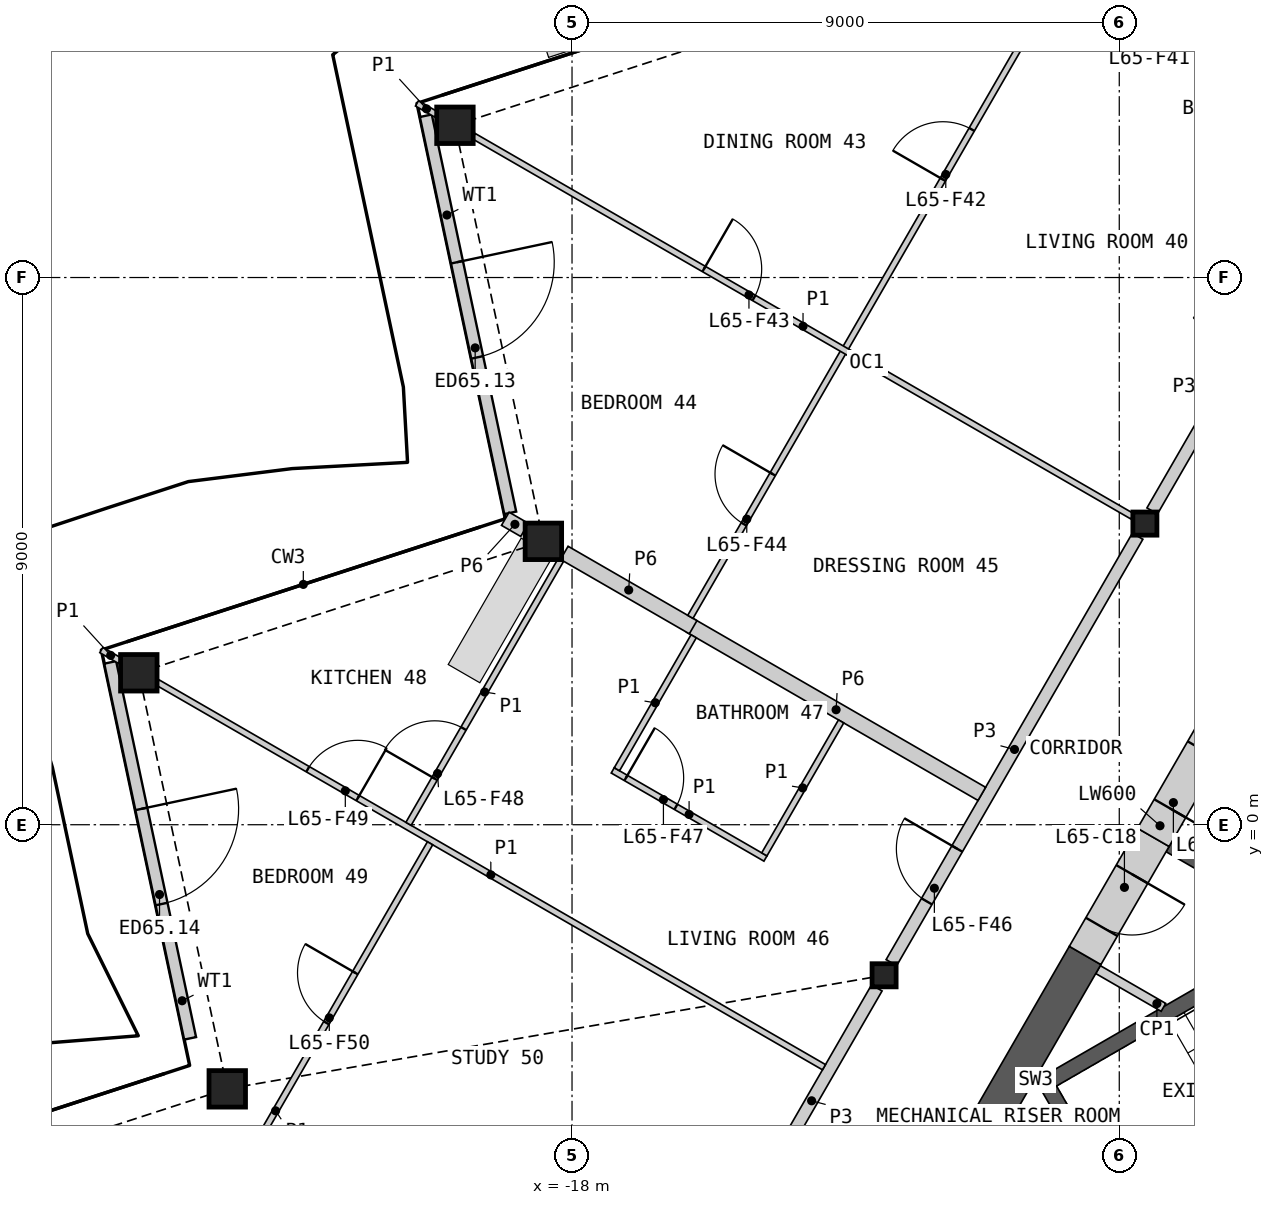
"""IFC4 building model, lengths in metres.
Left out: names, types, materials, properties, quantities, classifications, styles, units other than length and angle.
Written with IfcOpenShell. Run it as: python <this file> out.ifc"""

import sys

from ifc_helpers import new_model, si_unit, direction, frame, frame_2d, origin, origin_2d, place, context, subcontext, project, spatial, polyline, rectangle, hollow_rectangle, i_section, outline, extrude, element, fill, save


model = new_model("IFC4")
c1 = context("Model", 3, precision=1e-05, world=origin(), true_north=direction((0.0, 1.0)))
c2 = subcontext(c1, "Body", "Model", "MODEL_VIEW")
j1 = project(units=[si_unit("LENGTHUNIT", "METRE"), si_unit("PLANEANGLEUNIT", "RADIAN")], contexts=[c1])
p1 = place(None, origin())
s1 = spatial("IfcSite", under=j1, at=p1, CompositionType="ELEMENT")
p2 = place(p1, origin())
s2 = spatial("IfcBuilding", under=s1, at=p2, CompositionType="ELEMENT")
p3 = place(p2, frame((0.0, 0.0, 301.8)))
s3 = spatial("IfcBuildingStorey", under=s2, at=p3, CompositionType="ELEMENT", Elevation=301.8)
for number, where, z_axis, x_axis in (
    (1, (-19.926, 11.504, 0.0), (0.0, 0.0, 1.0), (1.0, 0.0, 0.0)),
    (2, (-18.471, 4.661, 0.0), (0.0, 0.0, 1.0), (1.0, 0.0, 0.0)),
    (3, (-25.125, 2.499, 0.0), (0.0, 0.0, 1.0), (1.0, 0.0, 0.0)),
    (4, (-23.67, -4.344, 0.0), (0.0, 0.0, 1.0), (1.0, 0.0, 0.0)),
):
    element("IfcColumn", number, at=place(p3, frame(where, z_axis=z_axis, x_axis=x_axis)), inside=s3, PredefinedType="COLUMN", context=c2, shape_type="SweptSolid", body=[
        extrude(hollow_rectangle(XDim=0.6, YDim=0.6, WallThickness=0.04, at=origin_2d()), origin(), (0.0, 0.0, 1.0), 3.4),
    ])
for number, where, z_axis, x_axis in (
    (5, (-8.578, 4.953, 0.0), (0.0, 0.0, 1.0), (1.0, 0.0, 0.0)),
    (6, (-12.868, -2.476, 0.0), (0.0, 0.0, 1.0), (1.0, 0.0, 0.0)),
):
    element("IfcColumn", number, at=place(p3, frame(where, z_axis=z_axis, x_axis=x_axis)), inside=s3, PredefinedType="COLUMN", context=c2, shape_type="SweptSolid", body=[
        extrude(i_section(OverallWidth=0.396, OverallDepth=0.381, WebThickness=0.019, FlangeThickness=0.03, at=origin_2d()), origin(), (0.0, 0.0, 1.0), 3.4),
    ])
p4 = place(p3, frame((-20.404, 11.661, 0.0), z_axis=(0.0, 0.0, 1.0), x_axis=(0.207893301034, -0.978151509422, 0.0)))
e7 = element("IfcWall", 7, at=p4, inside=s3, PredefinedType="SOLIDWALL", context=c2, shape_type="SweptSolid", body=[
    extrude(rectangle(XDim=6.677, YDim=0.2, at=frame_2d((3.339, 0.0))), origin(), (0.0, 0.0, 1.0), 2.488),
])
p5 = place(p4, frame((2.463, 0.0, 0.0)))
e8 = element("IfcOpeningElement", 8, at=p5, cuts=e7, PredefinedType="OPENING", context=c2, shape_type="SweptSolid", body=[
    extrude(rectangle(XDim=1.6, YDim=2.25, at=frame_2d((0.8, 1.125))), frame((0.0, 0.11, 0.0), z_axis=(0.0, -1.0, 0.0), x_axis=(1.0, 0.0, 0.0)), (0.0, 0.0, 1.0), 0.22),
])
p6 = place(p3, frame((-25.595, 2.67, 0.0), z_axis=(0.0, 0.0, 1.0), x_axis=(0.207888316408, -0.978152568826, 0.0)))
e9 = element("IfcWall", 9, at=p6, inside=s3, PredefinedType="SOLIDWALL", context=c2, shape_type="SweptSolid", body=[
    extrude(rectangle(XDim=6.322, YDim=0.2, at=frame_2d((3.161, 0.0))), origin(), (0.0, 0.0, 1.0), 2.488),
])
p7 = place(p6, frame((2.463, 0.0, 0.0)))
e10 = element("IfcOpeningElement", 10, at=p7, cuts=e9, PredefinedType="OPENING", context=c2, shape_type="SweptSolid", body=[
    extrude(rectangle(XDim=1.6, YDim=2.25, at=frame_2d((0.8, 1.125))), frame((0.0, 0.11, 0.0), z_axis=(0.0, -1.0, 0.0), x_axis=(1.0, 0.0, 0.0)), (0.0, 0.0, 1.0), 0.22),
])
p8 = place(p3, origin())
e11 = element("IfcWall", 11, at=p8, inside=s3, PredefinedType="SHEAR", context=c2, shape_type="SweptSolid", body=[
    extrude(outline(polyline([(-6.061, -1.697), (-8.231, -0.444), (-8.131, -0.271), (-5.96, -1.524), (-6.061, -1.697)])), origin(), (0.0, 0.0, 1.0), 3.1),
])
p9 = place(p3, origin())
e12 = element("IfcWall", 12, at=p9, inside=s3, PredefinedType="SHEAR", context=c2, shape_type="SweptSolid", body=[
    extrude(outline(polyline([(-5.307, -1.281), (-10.374, -4.206), (-10.032, -4.298), (-5.182, -1.498), (-5.307, -1.281)])), origin(), (0.0, 0.0, 1.0), 3.1),
])
p10 = place(p3, origin())
e13 = element("IfcWall", 13, at=p10, inside=s3, PredefinedType="SHEAR", context=c2, shape_type="SweptSolid", body=[
    extrude(outline(polyline([(-10.374, -4.206), (-8.83, -6.881), (-8.738, -6.539), (-10.032, -4.298), (-10.374, -4.206)])), origin(), (0.0, 0.0, 1.0), 3.1),
])
p11 = place(p3, origin())
e14 = element("IfcWall", 14, at=p11, inside=s3, PredefinedType="SHEAR", context=c2, shape_type="SweptSolid", body=[
    extrude(outline(polyline([(-8.738, -6.539), (-8.83, -6.881), (-3.763, -3.956), (-3.888, -3.739), (-8.738, -6.539)])), origin(), (0.0, 0.0, 1.0), 3.1),
])
p12 = place(p3, frame((-9.35, -2.383, 0.0), z_axis=(0.0, 0.0, 1.0), x_axis=(0.866057962423, -0.499943602543, 0.0)))
e15 = element("IfcWall", 15, at=p12, inside=s3, PredefinedType="PARTITIONING", context=c2, shape_type="SweptSolid", body=[
    extrude(rectangle(XDim=1.242, YDim=0.15, at=frame_2d((0.621, 0.0))), origin(), (0.0, 0.0, 1.0), 3.1),
])
p13 = place(p3, frame((-9.562, -2.15, 0.0), z_axis=(0.0, 0.0, 1.0), x_axis=(-0.500015214976, -0.866016619236, 0.0)))
e16 = element("IfcWall", 16, at=p13, inside=s3, PredefinedType="SHEAR", context=c2, shape_type="SweptSolid", body=[
    extrude(rectangle(XDim=5.318, YDim=0.6, at=frame_2d((2.659, 0.0))), origin(), (0.0, 0.0, 1.0), 3.1),
])
p14 = place(p3, frame((-8.44, -0.208, 0.0), z_axis=(0.0, 0.0, 1.0), x_axis=(-0.500001951578, -0.866024277037, 0.0)))
e17 = element("IfcWall", 17, at=p14, inside=s3, PredefinedType="SHEAR", context=c2, shape_type="SweptSolid", body=[
    extrude(rectangle(XDim=2.243, YDim=0.6, at=frame_2d((1.122, 0.0))), origin(), (0.0, 0.0, 1.0), 3.1),
])
p15 = place(p14, frame((0.7, 0.0, 0.0)))
e18 = element("IfcOpeningElement", 18, at=p15, cuts=e17, PredefinedType="OPENING", context=c2, shape_type="SweptSolid", body=[
    extrude(rectangle(XDim=1.0, YDim=2.1, at=frame_2d((0.5, 1.05))), frame((0.0, 0.31, 0.0), z_axis=(0.0, -1.0, 0.0), x_axis=(1.0, 0.0, 0.0)), (0.0, 0.0, 1.0), 0.62),
])
p16 = place(p3, frame((-7.34, 1.698, 0.0), z_axis=(0.0, 0.0, 1.0), x_axis=(-0.50002983664, -0.866008176907, 0.0)))
e19 = element("IfcWall", 19, at=p16, inside=s3, PredefinedType="SHEAR", context=c2, shape_type="SweptSolid", body=[
    extrude(rectangle(XDim=2.2, YDim=0.6, at=frame_2d((1.1, 0.0))), origin(), (0.0, 0.0, 1.0), 3.1),
])
p17 = place(p16, frame((0.55, 0.0, 0.0)))
e20 = element("IfcOpeningElement", 20, at=p17, cuts=e19, PredefinedType="OPENING", context=c2, shape_type="SweptSolid", body=[
    extrude(rectangle(XDim=1.1, YDim=2.1, at=frame_2d((0.55, 1.05))), frame((0.0, 0.31, 0.0), z_axis=(0.0, -1.0, 0.0), x_axis=(1.0, 0.0, 0.0)), (0.0, 0.0, 1.0), 0.62),
])
p18 = place(p3, frame((-8.458, 5.16, 0.0), z_axis=(0.0, 0.0, 1.0), x_axis=(0.499984266882, 0.866034487114, 0.0)))
e21 = element("IfcWall", 21, at=p18, inside=s3, PredefinedType="PARTITIONING", context=c2, shape_type="SweptSolid", body=[
    extrude(rectangle(XDim=8.099, YDim=0.2, at=frame_2d((4.049, 0.0))), origin(), (0.0, 0.0, 1.0), 3.1),
])
p19 = place(p18, frame((3.093, 0.0, 0.0)))
e22 = element("IfcOpeningElement", 22, at=p19, cuts=e21, PredefinedType="OPENING", context=c2, shape_type="SweptSolid", body=[
    extrude(rectangle(XDim=1.0, YDim=2.1, at=frame_2d((0.5, 1.05))), frame((0.0, 0.11, 0.0), z_axis=(0.0, -1.0, 0.0), x_axis=(1.0, 0.0, 0.0)), (0.0, 0.0, 1.0), 0.22),
])
p20 = place(p3, frame((-12.748, -2.269, 0.0), z_axis=(0.0, 0.0, 1.0), x_axis=(0.499984266882, 0.866034487114, 0.0)))
e23 = element("IfcWall", 23, at=p20, inside=s3, PredefinedType="PARTITIONING", context=c2, shape_type="SweptSolid", body=[
    extrude(rectangle(XDim=8.099, YDim=0.2, at=frame_2d((4.049, 0.0))), origin(), (0.0, 0.0, 1.0), 3.1),
])
p21 = place(p20, frame((1.164, 0.0, 0.0)))
e24 = element("IfcOpeningElement", 24, at=p21, cuts=e23, PredefinedType="OPENING", context=c2, shape_type="SweptSolid", body=[
    extrude(rectangle(XDim=1.0, YDim=2.1, at=frame_2d((0.5, 1.05))), frame((0.0, 0.11, 0.0), z_axis=(0.0, -1.0, 0.0), x_axis=(1.0, 0.0, 0.0)), (0.0, 0.0, 1.0), 0.22),
])
p22 = place(p3, frame((-16.054, 3.275, 0.0), z_axis=(0.0, 0.0, 1.0), x_axis=(0.866019581949, -0.500010083578, 0.0)))
e25 = element("IfcWall", 25, at=p22, inside=s3, PredefinedType="PARTITIONING", context=c2, shape_type="SweptSolid", body=[
    extrude(rectangle(XDim=5.535, YDim=0.25, at=frame_2d((2.768, 0.0))), origin(), (0.0, 0.0, 1.0), 2.33),
])
p23 = place(p3, frame((-15.131, -6.397, 0.0), z_axis=(0.0, 0.0, 1.0), x_axis=(0.500003406062, 0.866023437285, 0.0)))
e26 = element("IfcWall", 26, at=p23, inside=s3, PredefinedType="PARTITIONING", context=c2, shape_type="SweptSolid", body=[
    extrude(rectangle(XDim=4.288, YDim=0.2, at=frame_2d((2.144, 0.0))), origin(), (0.0, 0.0, 1.0), 3.1),
])
p24 = place(p3, frame((-18.127, 4.472, 0.0), z_axis=(0.0, 0.0, 1.0), x_axis=(0.866017755388, -0.500013247177, 0.0)))
e27 = element("IfcWall", 27, at=p24, inside=s3, PredefinedType="PARTITIONING", context=c2, shape_type="SweptSolid", body=[
    extrude(rectangle(XDim=2.447, YDim=0.25, at=frame_2d((1.223, 0.0))), origin(), (0.0, 0.0, 1.0), 2.33),
])
p25 = place(p3, frame((-19.097, 5.032, 0.0), z_axis=(0.0, 0.0, 1.0), x_axis=(0.86609656662, -0.499876722092, 0.0)))
e28 = element("IfcWall", 28, at=p25, inside=s3, PredefinedType="PARTITIONING", context=c2, shape_type="SweptSolid", body=[
    extrude(rectangle(XDim=0.365, YDim=0.25, at=frame_2d((0.183, 0.0))), origin(), (0.0, 0.0, 1.0), 2.33),
])
p26 = place(p3, frame((-16.054, 3.419, 0.0), z_axis=(0.0, 0.0, 1.0), x_axis=(0.499999256795, 0.866025832873, 0.0)))
e29 = element("IfcWall", 29, at=p26, inside=s3, PredefinedType="PARTITIONING", context=c2, shape_type="SweptSolid", body=[
    extrude(rectangle(XDim=15.448, YDim=0.1, at=frame_2d((7.724, 0.0))), origin(), (0.0, 0.0, 1.0), 2.33),
])
p27 = place(p26, frame((8.306, 0.0, 0.0)))
e30 = element("IfcOpeningElement", 30, at=p27, cuts=e29, PredefinedType="OPENING", context=c2, shape_type="SweptSolid", body=[
    extrude(rectangle(XDim=0.95, YDim=2.1, at=frame_2d((0.475, 1.05))), frame((0.0, 0.06, 0.0), z_axis=(0.0, -1.0, 0.0), x_axis=(1.0, 0.0, 0.0)), (0.0, 0.0, 1.0), 0.12),
])
p28 = place(p26, frame((1.76, 0.0, 0.0)))
e31 = element("IfcOpeningElement", 31, at=p28, cuts=e29, PredefinedType="OPENING", context=c2, shape_type="SweptSolid", body=[
    extrude(rectangle(XDim=0.95, YDim=2.1, at=frame_2d((0.475, 1.05))), frame((0.0, 0.06, 0.0), z_axis=(0.0, -1.0, 0.0), x_axis=(1.0, 0.0, 0.0)), (0.0, 0.0, 1.0), 0.12),
])
p29 = place(p3, frame((-24.815, 2.339, 0.0), z_axis=(0.0, 0.0, 1.0), x_axis=(0.866021406514, -0.500006923412, 0.0)))
e32 = element("IfcWall", 32, at=p29, inside=s3, PredefinedType="PARTITIONING", context=c2, shape_type="SweptSolid", body=[
    extrude(rectangle(XDim=12.654, YDim=0.1, at=frame_2d((6.327, 0.0))), origin(), (0.0, 0.0, 1.0), 2.33),
])
p30 = place(p29, frame((2.851, 0.0, 0.0)))
e33 = element("IfcOpeningElement", 33, at=p30, cuts=e32, PredefinedType="OPENING", context=c2, shape_type="SweptSolid", body=[
    extrude(rectangle(XDim=0.95, YDim=2.1, at=frame_2d((0.475, 1.05))), frame((0.0, 0.06, 0.0), z_axis=(0.0, -1.0, 0.0), x_axis=(1.0, 0.0, 0.0)), (0.0, 0.0, 1.0), 0.12),
])
p31 = place(p3, frame((-19.615, 11.325, 0.0), z_axis=(0.0, 0.0, 1.0), x_axis=(0.86602139559, -0.500006942333, 0.0)))
e34 = element("IfcWall", 34, at=p31, inside=s3, PredefinedType="PARTITIONING", context=c2, shape_type="SweptSolid", body=[
    extrude(rectangle(XDim=12.505, YDim=0.1, at=frame_2d((6.252, 0.0))), origin(), (0.0, 0.0, 1.0), 2.33),
])
p32 = place(p31, frame((4.37, 0.0, 0.0)))
e35 = element("IfcOpeningElement", 35, at=p32, cuts=e34, PredefinedType="OPENING", context=c2, shape_type="SweptSolid", body=[
    extrude(rectangle(XDim=0.95, YDim=2.1, at=frame_2d((0.475, 1.05))), frame((0.0, 0.06, 0.0), z_axis=(0.0, -1.0, 0.0), x_axis=(1.0, 0.0, 0.0)), (0.0, 0.0, 1.0), 0.12),
])
p33 = place(p3, frame((-23.722, -6.172, 0.0), z_axis=(0.0, 0.0, 1.0), x_axis=(0.499991774685, 0.86603015262, 0.0)))
e36 = element("IfcWall", 36, at=p33, inside=s3, PredefinedType="PARTITIONING", context=c2, shape_type="SweptSolid", body=[
    extrude(rectangle(XDim=6.774, YDim=0.1, at=frame_2d((3.387, 0.0))), origin(), (0.0, 0.0, 1.0), 2.33),
])
p34 = place(p33, frame((3.364, 0.0, 0.0)))
e37 = element("IfcOpeningElement", 37, at=p34, cuts=e36, PredefinedType="OPENING", context=c2, shape_type="SweptSolid", body=[
    extrude(rectangle(XDim=0.95, YDim=2.1, at=frame_2d((0.475, 1.05))), frame((0.0, 0.06, 0.0), z_axis=(0.0, -1.0, 0.0), x_axis=(1.0, 0.0, 0.0)), (0.0, 0.0, 1.0), 0.12),
])
p35 = place(p3, frame((-9.787, 14.174, 0.0), z_axis=(0.0, 0.0, 1.0), x_axis=(0.866031222068, -0.499989922303, 0.0)))
e38 = element("IfcWall", 38, at=p35, inside=s3, PredefinedType="PARTITIONING", context=c2, shape_type="SweptSolid", body=[
    extrude(rectangle(XDim=5.557, YDim=0.1, at=frame_2d((2.779, 0.0))), origin(), (0.0, 0.0, 1.0), 2.33),
])
p36 = place(p35, frame((1.853, 0.0, 0.0)))
e39 = element("IfcOpeningElement", 39, at=p36, cuts=e38, PredefinedType="OPENING", context=c2, shape_type="SweptSolid", body=[
    extrude(rectangle(XDim=0.95, YDim=2.1, at=frame_2d((0.475, 1.05))), frame((0.0, 0.06, 0.0), z_axis=(0.0, -1.0, 0.0), x_axis=(1.0, 0.0, 0.0)), (0.0, 0.0, 1.0), 0.12),
])
p37 = place(p3, frame((-20.689, 0.014, 0.0), z_axis=(0.0, 0.0, 1.0), x_axis=(0.500003822013, 0.866023197133, 0.0)))
e40 = element("IfcWall", 40, at=p37, inside=s3, PredefinedType="PARTITIONING", context=c2, shape_type="SweptSolid", body=[
    extrude(rectangle(XDim=5.007, YDim=0.1, at=frame_2d((2.504, 0.0))), origin(), (0.0, 0.0, 1.0), 2.33),
])
p38 = place(p37, frame((0.86, 0.0, 0.0)))
e41 = element("IfcOpeningElement", 41, at=p38, cuts=e40, PredefinedType="OPENING", context=c2, shape_type="SweptSolid", body=[
    extrude(rectangle(XDim=0.95, YDim=2.1, at=frame_2d((0.475, 1.05))), frame((0.0, 0.06, 0.0), z_axis=(0.0, -1.0, 0.0), x_axis=(1.0, 0.0, 0.0)), (0.0, 0.0, 1.0), 0.12),
])
p39 = place(p3, frame((-17.33, 0.894, 0.0), z_axis=(0.0, 0.0, 1.0), x_axis=(0.866032775405, -0.499987231761, 0.0)))
e42 = element("IfcWall", 42, at=p39, inside=s3, PredefinedType="PARTITIONING", context=c2, shape_type="SweptSolid", body=[
    extrude(rectangle(XDim=2.9, YDim=0.1, at=frame_2d((1.45, 0.0))), origin(), (0.0, 0.0, 1.0), 2.33),
])
p40 = place(p39, frame((0.25, 0.0, 0.0)))
e43 = element("IfcOpeningElement", 43, at=p40, cuts=e42, PredefinedType="OPENING", context=c2, shape_type="SweptSolid", body=[
    extrude(rectangle(XDim=0.95, YDim=2.1, at=frame_2d((0.475, 1.05))), frame((0.0, 0.06, 0.0), z_axis=(0.0, -1.0, 0.0), x_axis=(1.0, 0.0, 0.0)), (0.0, 0.0, 1.0), 0.12),
])
p41 = place(p3, frame((-14.837, -0.488, 0.0), z_axis=(0.0, 0.0, 1.0), x_axis=(0.499976333282, 0.866039067339, 0.0)))
e44 = element("IfcWall", 44, at=p41, inside=s3, PredefinedType="PARTITIONING", context=c2, shape_type="SweptSolid", body=[
    extrude(rectangle(XDim=2.525, YDim=0.1, at=frame_2d((1.262, 0.0))), origin(), (0.0, 0.0, 1.0), 2.33),
])
p42 = place(p3, frame((-17.262, 0.912, 0.0), z_axis=(0.0, 0.0, 1.0), x_axis=(0.500048846702, 0.865997200291, 0.0)))
e45 = element("IfcWall", 45, at=p42, inside=s3, PredefinedType="PARTITIONING", context=c2, shape_type="SweptSolid", body=[
    extrude(rectangle(XDim=2.525, YDim=0.1, at=frame_2d((1.263, 0.0))), origin(), (0.0, 0.0, 1.0), 2.33),
])
p43 = place(p3, frame((-20.55, 11.865, 0.0), z_axis=(0.0, 0.0, 1.0), x_axis=(0.866039913117, -0.499974868256, 0.0)))
e46 = element("IfcWall", 46, at=p43, inside=s3, PredefinedType="PARTITIONING", context=c2, shape_type="SweptSolid", body=[
    extrude(rectangle(XDim=0.363, YDim=0.1, at=frame_2d((0.181, 0.0))), origin(), (0.0, 0.0, 1.0), 2.33),
])
p44 = place(p3, frame((-25.741, 2.874, 0.0), z_axis=(0.0, 0.0, 1.0), x_axis=(0.865851769275, -0.500300623268, 0.0)))
e47 = element("IfcWall", 47, at=p44, inside=s3, PredefinedType="PARTITIONING", context=c2, shape_type="SweptSolid", body=[
    extrude(rectangle(XDim=0.353, YDim=0.1, at=frame_2d((0.177, 0.0))), origin(), (0.0, 0.0, 1.0), 2.33),
])
p45 = place(p5, origin())
e48 = element("IfcDoor", 48, at=p45, inside=s3, OperationType="DOUBLE_DOOR_SINGLE_SWING", PredefinedType="DOOR", context=c2, shape_type="SweptSolid", body=[
    extrude(rectangle(XDim=1.6, YDim=2.25, at=frame_2d((0.8, 1.125))), frame((0.0, 0.025, 0.0), z_axis=(0.0, -1.0, 0.0), x_axis=(1.0, 0.0, 0.0)), (0.0, 0.0, 1.0), 0.05),
])
fill(e8, e48)
p46 = place(p7, origin())
e49 = element("IfcDoor", 49, at=p46, inside=s3, OperationType="DOUBLE_DOOR_SINGLE_SWING", PredefinedType="DOOR", context=c2, shape_type="SweptSolid", body=[
    extrude(rectangle(XDim=1.6, YDim=2.25, at=frame_2d((0.8, 1.125))), frame((0.0, 0.025, 0.0), z_axis=(0.0, -1.0, 0.0), x_axis=(1.0, 0.0, 0.0)), (0.0, 0.0, 1.0), 0.05),
])
fill(e10, e49)
p47 = place(p15, origin())
e50 = element("IfcDoor", 50, at=p47, inside=s3, OperationType="SINGLE_SWING_LEFT", PredefinedType="DOOR", context=c2, shape_type="SweptSolid", body=[
    extrude(rectangle(XDim=1.0, YDim=2.1, at=frame_2d((0.5, 1.05))), frame((0.0, 0.055, 0.0), z_axis=(0.0, -1.0, 0.0), x_axis=(1.0, 0.0, 0.0)), (0.0, 0.0, 1.0), 0.05),
])
fill(e18, e50)
p48 = place(p17, origin())
e51 = element("IfcDoor", 51, at=p48, inside=s3, OperationType="SINGLE_SWING_RIGHT", PredefinedType="DOOR", context=c2, shape_type="SweptSolid", body=[
    extrude(rectangle(XDim=1.1, YDim=2.1, at=frame_2d((0.55, 1.05))), frame((0.0, 0.055, 0.0), z_axis=(0.0, -1.0, 0.0), x_axis=(1.0, 0.0, 0.0)), (0.0, 0.0, 1.0), 0.05),
])
fill(e20, e51)
p49 = place(p27, origin())
e52 = element("IfcDoor", 52, at=p49, inside=s3, OperationType="SINGLE_SWING_LEFT", PredefinedType="DOOR", context=c2, shape_type="SweptSolid", body=[
    extrude(rectangle(XDim=0.95, YDim=2.1, at=frame_2d((0.475, 1.05))), frame((0.0, 0.025, 0.0), z_axis=(0.0, -1.0, 0.0), x_axis=(1.0, 0.0, 0.0)), (0.0, 0.0, 1.0), 0.05),
])
fill(e30, e52)
p50 = place(p32, origin())
e53 = element("IfcDoor", 53, at=p50, inside=s3, OperationType="SINGLE_SWING_LEFT", PredefinedType="DOOR", context=c2, shape_type="SweptSolid", body=[
    extrude(rectangle(XDim=0.95, YDim=2.1, at=frame_2d((0.475, 1.05))), frame((0.0, 0.025, 0.0), z_axis=(0.0, -1.0, 0.0), x_axis=(1.0, 0.0, 0.0)), (0.0, 0.0, 1.0), 0.05),
])
fill(e35, e53)
p51 = place(p28, origin())
e54 = element("IfcDoor", 54, at=p51, inside=s3, OperationType="SINGLE_SWING_RIGHT", PredefinedType="DOOR", context=c2, shape_type="SweptSolid", body=[
    extrude(rectangle(XDim=0.95, YDim=2.1, at=frame_2d((0.475, 1.05))), frame((0.0, 0.025, 0.0), z_axis=(0.0, -1.0, 0.0), x_axis=(1.0, 0.0, 0.0)), (0.0, 0.0, 1.0), 0.05),
])
fill(e31, e54)
p52 = place(p21, origin())
e55 = element("IfcDoor", 55, at=p52, inside=s3, OperationType="SINGLE_SWING_RIGHT", PredefinedType="DOOR", context=c2, shape_type="SweptSolid", body=[
    extrude(rectangle(XDim=1.0, YDim=2.1, at=frame_2d((0.5, 1.05))), frame((0.0, 0.025, 0.0), z_axis=(0.0, -1.0, 0.0), x_axis=(1.0, 0.0, 0.0)), (0.0, 0.0, 1.0), 0.05),
])
fill(e24, e55)
p53 = place(p40, origin())
e56 = element("IfcDoor", 56, at=p53, inside=s3, OperationType="SINGLE_SWING_LEFT", PredefinedType="DOOR", context=c2, shape_type="SweptSolid", body=[
    extrude(rectangle(XDim=0.95, YDim=2.1, at=frame_2d((0.475, 1.05))), frame((0.0, 0.025, 0.0), z_axis=(0.0, -1.0, 0.0), x_axis=(1.0, 0.0, 0.0)), (0.0, 0.0, 1.0), 0.05),
])
fill(e43, e56)
p54 = place(p38, origin())
e57 = element("IfcDoor", 57, at=p54, inside=s3, OperationType="SINGLE_SWING_LEFT", PredefinedType="DOOR", context=c2, shape_type="SweptSolid", body=[
    extrude(rectangle(XDim=0.95, YDim=2.1, at=frame_2d((0.475, 1.05))), frame((0.0, 0.025, 0.0), z_axis=(0.0, -1.0, 0.0), x_axis=(1.0, 0.0, 0.0)), (0.0, 0.0, 1.0), 0.05),
])
fill(e41, e57)
p55 = place(p30, origin())
e58 = element("IfcDoor", 58, at=p55, inside=s3, OperationType="SINGLE_SWING_RIGHT", PredefinedType="DOOR", context=c2, shape_type="SweptSolid", body=[
    extrude(rectangle(XDim=0.95, YDim=2.1, at=frame_2d((0.475, 1.05))), frame((0.0, 0.025, 0.0), z_axis=(0.0, -1.0, 0.0), x_axis=(1.0, 0.0, 0.0)), (0.0, 0.0, 1.0), 0.05),
])
fill(e33, e58)
p56 = place(p34, origin())
e59 = element("IfcDoor", 59, at=p56, inside=s3, OperationType="SINGLE_SWING_RIGHT", PredefinedType="DOOR", context=c2, shape_type="SweptSolid", body=[
    extrude(rectangle(XDim=0.95, YDim=2.1, at=frame_2d((0.475, 1.05))), frame((0.0, 0.025, 0.0), z_axis=(0.0, -1.0, 0.0), x_axis=(1.0, 0.0, 0.0)), (0.0, 0.0, 1.0), 0.05),
])
fill(e37, e59)
save(model, sys.argv[1])
